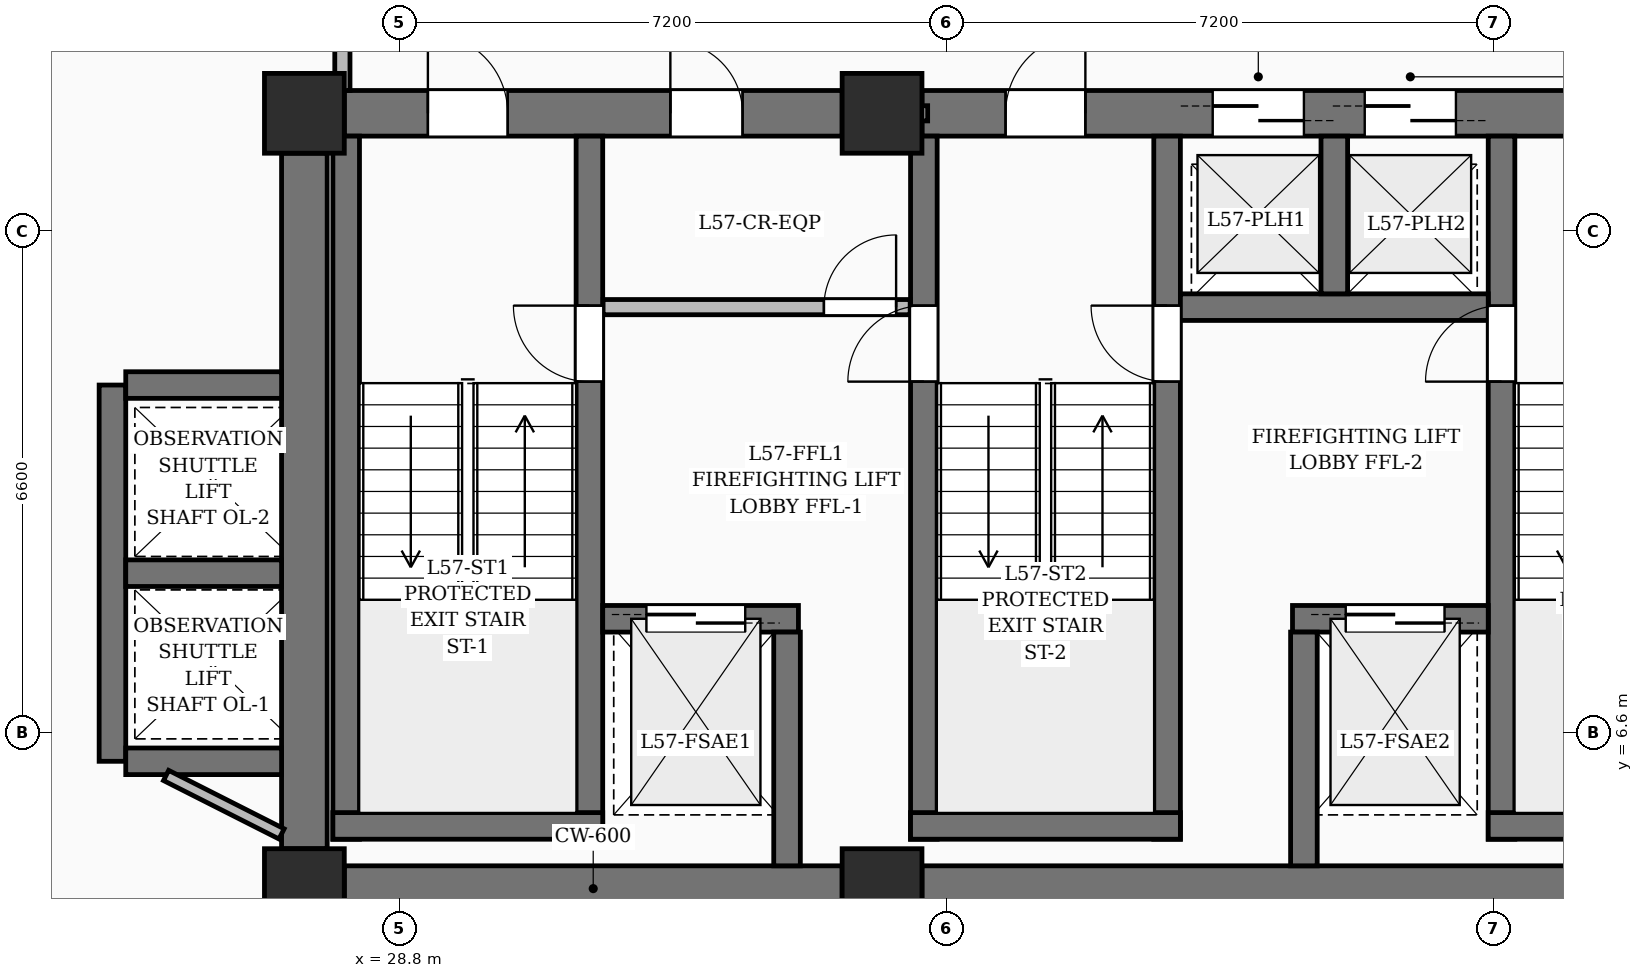
"""IFC4 building model, lengths in metres.
Left out: names, types, materials, properties, quantities, classifications, styles, units other than length and angle.
Written with IfcOpenShell. Run it as: python <this file> out.ifc"""

import sys

from ifc_helpers import new_model, si_unit, direction, frame, frame_2d, origin, origin_2d, place, context, subcontext, project, spatial, rectangle, extrude, element, fill, save


model = new_model("IFC4")
c1 = context("Model", 3, precision=1e-05, world=origin(), true_north=direction((0.0, 1.0)))
c2 = subcontext(c1, "Body", "Model", "MODEL_VIEW")
j1 = project(units=[si_unit("LENGTHUNIT", "METRE"), si_unit("PLANEANGLEUNIT", "RADIAN")], contexts=[c1])
p1 = place(None, origin())
s1 = spatial("IfcSite", under=j1, at=p1, CompositionType="ELEMENT")
p2 = place(p1, origin())
s2 = spatial("IfcBuilding", under=s1, at=p2, CompositionType="ELEMENT")
p3 = place(p2, frame((0.0, 0.0, 222.0)))
s3 = spatial("IfcBuildingStorey", under=s2, at=p3, CompositionType="ELEMENT", Elevation=222.0)
for number, where, z_axis, x_axis in (
    (1, (27.55, 4.55, 0.0), (0.0, 0.0, 1.0), (1.0, 0.0, 0.0)),
    (2, (35.15, 4.55, 0.0), (0.0, 0.0, 1.0), (1.0, 0.0, 0.0)),
    (3, (27.55, 14.75, 0.0), (0.0, 0.0, 1.0), (1.0, 0.0, 0.0)),
    (4, (35.15, 14.75, 0.0), (0.0, 0.0, 1.0), (1.0, 0.0, 0.0)),
):
    element("IfcColumn", number, at=place(p3, frame(where, z_axis=z_axis, x_axis=x_axis)), inside=s3, PredefinedType="COLUMN", context=c2, shape_type="SweptSolid", body=[
        extrude(rectangle(XDim=1.05, YDim=1.05, at=origin_2d()), origin(), (0.0, 0.0, 1.0), 3.75),
    ])
p4 = place(p3, frame((28.075, 4.55, 0.0), z_axis=(0.0, 0.0, 1.0), x_axis=(1.0, 0.0, 0.0)))
e5 = element("IfcWall", 5, at=p4, inside=s3, PredefinedType="SHEAR", context=c2, shape_type="SweptSolid", body=[
    extrude(rectangle(XDim=6.55, YDim=0.6, at=frame_2d((3.275, 0.0))), origin(), (0.0, 0.0, 1.0), 3.75),
])
p5 = place(p3, frame((35.675, 4.55, 0.0), z_axis=(0.0, 0.0, 1.0), x_axis=(1.0, 0.0, 0.0)))
e6 = element("IfcWall", 6, at=p5, inside=s3, PredefinedType="SHEAR", context=c2, shape_type="SweptSolid", body=[
    extrude(rectangle(XDim=10.85, YDim=0.6, at=frame_2d((5.425, 0.0))), origin(), (0.0, 0.0, 1.0), 3.75),
])
p6 = place(p3, frame((28.075, 14.75, 0.0), z_axis=(0.0, 0.0, 1.0), x_axis=(1.0, 0.0, 0.0)))
e7 = element("IfcWall", 7, at=p6, inside=s3, PredefinedType="SHEAR", context=c2, shape_type="SweptSolid", body=[
    extrude(rectangle(XDim=6.55, YDim=0.6, at=frame_2d((3.275, 0.0))), origin(), (0.0, 0.0, 1.0), 3.75),
])
p7 = place(p6, frame((1.1, 0.0, 0.0)))
e8 = element("IfcOpeningElement", 8, at=p7, cuts=e7, PredefinedType="OPENING", context=c2, shape_type="SweptSolid", body=[
    extrude(rectangle(XDim=1.05, YDim=2.15, at=frame_2d((0.525, 1.075))), frame((0.0, 0.31, 0.0), z_axis=(0.0, -1.0, 0.0), x_axis=(1.0, 0.0, 0.0)), (0.0, 0.0, 1.0), 0.62),
])
p8 = place(p6, frame((4.29, 0.0, 0.0)))
e9 = element("IfcOpeningElement", 9, at=p8, cuts=e7, PredefinedType="OPENING", context=c2, shape_type="SweptSolid", body=[
    extrude(rectangle(XDim=0.95, YDim=2.15, at=frame_2d((0.475, 1.075))), frame((0.0, 0.31, 0.0), z_axis=(0.0, -1.0, 0.0), x_axis=(1.0, 0.0, 0.0)), (0.0, 0.0, 1.0), 0.62),
])
p9 = place(p3, frame((35.675, 14.75, 0.0), z_axis=(0.0, 0.0, 1.0), x_axis=(1.0, 0.0, 0.0)))
e10 = element("IfcWall", 10, at=p9, inside=s3, PredefinedType="SHEAR", context=c2, shape_type="SweptSolid", body=[
    extrude(rectangle(XDim=10.85, YDim=0.6, at=frame_2d((5.425, 0.0))), origin(), (0.0, 0.0, 1.0), 3.75),
])
p10 = place(p9, frame((1.1, 0.0, 0.0)))
e11 = element("IfcOpeningElement", 11, at=p10, cuts=e10, PredefinedType="OPENING", context=c2, shape_type="SweptSolid", body=[
    extrude(rectangle(XDim=1.05, YDim=2.15, at=frame_2d((0.525, 1.075))), frame((0.0, 0.31, 0.0), z_axis=(0.0, -1.0, 0.0), x_axis=(1.0, 0.0, 0.0)), (0.0, 0.0, 1.0), 0.62),
])
p11 = place(p9, frame((8.7, 0.0, 0.0)))
e12 = element("IfcOpeningElement", 12, at=p11, cuts=e10, PredefinedType="OPENING", context=c2, shape_type="SweptSolid", body=[
    extrude(rectangle(XDim=1.05, YDim=2.15, at=frame_2d((0.525, 1.075))), frame((0.0, 0.31, 0.0), z_axis=(0.0, -1.0, 0.0), x_axis=(1.0, 0.0, 0.0)), (0.0, 0.0, 1.0), 0.62),
])
p12 = place(p9, frame((3.825, 0.0, 0.0)))
e13 = element("IfcOpeningElement", 13, at=p12, cuts=e10, PredefinedType="OPENING", context=c2, shape_type="SweptSolid", body=[
    extrude(rectangle(XDim=1.2, YDim=2.2, at=frame_2d((0.6, 1.1))), frame((0.0, 0.31, 0.0), z_axis=(0.0, -1.0, 0.0), x_axis=(1.0, 0.0, 0.0)), (0.0, 0.0, 1.0), 0.62),
])
p13 = place(p9, frame((5.825, 0.0, 0.0)))
e14 = element("IfcOpeningElement", 14, at=p13, cuts=e10, PredefinedType="OPENING", context=c2, shape_type="SweptSolid", body=[
    extrude(rectangle(XDim=1.2, YDim=2.2, at=frame_2d((0.6, 1.1))), frame((0.0, 0.31, 0.0), z_axis=(0.0, -1.0, 0.0), x_axis=(1.0, 0.0, 0.0)), (0.0, 0.0, 1.0), 0.62),
])
p14 = place(p3, frame((27.55, 5.075, 0.0), z_axis=(0.0, 0.0, 1.0), x_axis=(0.0, 1.0, 0.0)))
e15 = element("IfcWall", 15, at=p14, inside=s3, PredefinedType="SHEAR", context=c2, shape_type="SweptSolid", body=[
    extrude(rectangle(XDim=9.15, YDim=0.6, at=frame_2d((4.575, 0.0))), origin(), (0.0, 0.0, 1.0), 3.75),
])
p15 = place(p3, frame((28.1, 5.2, 0.0), z_axis=(0.0, 0.0, 1.0), x_axis=(0.0, 1.0, 0.0)))
e16 = element("IfcWall", 16, at=p15, inside=s3, PredefinedType="SOLIDWALL", context=c2, shape_type="SweptSolid", body=[
    extrude(rectangle(XDim=9.25, YDim=0.35, at=frame_2d((4.625, 0.0))), origin(), (0.0, 0.0, 1.0), 3.75),
])
p16 = place(p3, frame((31.3, 5.2, 0.0), z_axis=(0.0, 0.0, 1.0), x_axis=(0.0, 1.0, 0.0)))
e17 = element("IfcWall", 17, at=p16, inside=s3, PredefinedType="SOLIDWALL", context=c2, shape_type="SweptSolid", body=[
    extrude(rectangle(XDim=9.25, YDim=0.35, at=frame_2d((4.625, 0.0))), origin(), (0.0, 0.0, 1.0), 3.75),
])
p17 = place(p16, frame((6.02, 0.0, 0.0)))
e18 = element("IfcOpeningElement", 18, at=p17, cuts=e17, PredefinedType="OPENING", context=c2, shape_type="SweptSolid", body=[
    extrude(rectangle(XDim=1.0, YDim=2.15, at=frame_2d((0.5, 1.075))), frame((0.0, 0.185, 0.0), z_axis=(0.0, -1.0, 0.0), x_axis=(1.0, 0.0, 0.0)), (0.0, 0.0, 1.0), 0.37),
])
p18 = place(p3, frame((27.925, 5.375, 0.0), z_axis=(0.0, 0.0, 1.0), x_axis=(1.0, 0.0, 0.0)))
e19 = element("IfcWall", 19, at=p18, inside=s3, PredefinedType="SOLIDWALL", context=c2, shape_type="SweptSolid", body=[
    extrude(rectangle(XDim=3.55, YDim=0.35, at=frame_2d((1.775, 0.0))), origin(), (0.0, 0.0, 1.0), 3.75),
])
p19 = place(p3, frame((35.7, 5.2, 0.0), z_axis=(0.0, 0.0, 1.0), x_axis=(0.0, 1.0, 0.0)))
e20 = element("IfcWall", 20, at=p19, inside=s3, PredefinedType="SOLIDWALL", context=c2, shape_type="SweptSolid", body=[
    extrude(rectangle(XDim=9.25, YDim=0.35, at=frame_2d((4.625, 0.0))), origin(), (0.0, 0.0, 1.0), 3.75),
])
p20 = place(p19, frame((6.02, 0.0, 0.0)))
e21 = element("IfcOpeningElement", 21, at=p20, cuts=e20, PredefinedType="OPENING", context=c2, shape_type="SweptSolid", body=[
    extrude(rectangle(XDim=1.0, YDim=2.15, at=frame_2d((0.5, 1.075))), frame((0.0, 0.185, 0.0), z_axis=(0.0, -1.0, 0.0), x_axis=(1.0, 0.0, 0.0)), (0.0, 0.0, 1.0), 0.37),
])
p21 = place(p3, frame((38.9, 5.2, 0.0), z_axis=(0.0, 0.0, 1.0), x_axis=(0.0, 1.0, 0.0)))
e22 = element("IfcWall", 22, at=p21, inside=s3, PredefinedType="SOLIDWALL", context=c2, shape_type="SweptSolid", body=[
    extrude(rectangle(XDim=9.25, YDim=0.35, at=frame_2d((4.625, 0.0))), origin(), (0.0, 0.0, 1.0), 3.75),
])
p22 = place(p21, frame((6.02, 0.0, 0.0)))
e23 = element("IfcOpeningElement", 23, at=p22, cuts=e22, PredefinedType="OPENING", context=c2, shape_type="SweptSolid", body=[
    extrude(rectangle(XDim=1.0, YDim=2.15, at=frame_2d((0.5, 1.075))), frame((0.0, 0.185, 0.0), z_axis=(0.0, -1.0, 0.0), x_axis=(1.0, 0.0, 0.0)), (0.0, 0.0, 1.0), 0.37),
])
p23 = place(p3, frame((35.525, 5.375, 0.0), z_axis=(0.0, 0.0, 1.0), x_axis=(1.0, 0.0, 0.0)))
e24 = element("IfcWall", 24, at=p23, inside=s3, PredefinedType="SOLIDWALL", context=c2, shape_type="SweptSolid", body=[
    extrude(rectangle(XDim=3.55, YDim=0.35, at=frame_2d((1.775, 0.0))), origin(), (0.0, 0.0, 1.0), 3.75),
])
p24 = place(p3, frame((43.3, 5.2, 0.0), z_axis=(0.0, 0.0, 1.0), x_axis=(0.0, 1.0, 0.0)))
e25 = element("IfcWall", 25, at=p24, inside=s3, PredefinedType="SOLIDWALL", context=c2, shape_type="SweptSolid", body=[
    extrude(rectangle(XDim=9.25, YDim=0.35, at=frame_2d((4.625, 0.0))), origin(), (0.0, 0.0, 1.0), 3.75),
])
p25 = place(p24, frame((6.02, 0.0, 0.0)))
e26 = element("IfcOpeningElement", 26, at=p25, cuts=e25, PredefinedType="OPENING", context=c2, shape_type="SweptSolid", body=[
    extrude(rectangle(XDim=1.0, YDim=2.15, at=frame_2d((0.5, 1.075))), frame((0.0, 0.185, 0.0), z_axis=(0.0, -1.0, 0.0), x_axis=(1.0, 0.0, 0.0)), (0.0, 0.0, 1.0), 0.37),
])
p26 = place(p3, frame((43.125, 5.375, 0.0), z_axis=(0.0, 0.0, 1.0), x_axis=(1.0, 0.0, 0.0)))
e27 = element("IfcWall", 27, at=p26, inside=s3, PredefinedType="SOLIDWALL", context=c2, shape_type="SweptSolid", body=[
    extrude(rectangle(XDim=3.55, YDim=0.35, at=frame_2d((1.775, 0.0))), origin(), (0.0, 0.0, 1.0), 3.75),
])
p27 = place(p3, frame((31.475, 8.1, 0.0), z_axis=(0.0, 0.0, 1.0), x_axis=(1.0, 0.0, 0.0)))
e28 = element("IfcWall", 28, at=p27, inside=s3, PredefinedType="SOLIDWALL", context=c2, shape_type="SweptSolid", body=[
    extrude(rectangle(XDim=2.575, YDim=0.35, at=frame_2d((1.288, 0.0))), origin(), (0.0, 0.0, 1.0), 3.75),
])
p28 = place(p27, frame((0.575, 0.0, 0.0)))
e29 = element("IfcOpeningElement", 29, at=p28, cuts=e28, PredefinedType="OPENING", context=c2, shape_type="SweptSolid", body=[
    extrude(rectangle(XDim=1.3, YDim=2.25, at=frame_2d((0.65, 1.125))), frame((0.0, 0.185, 0.0), z_axis=(0.0, -1.0, 0.0), x_axis=(1.0, 0.0, 0.0)), (0.0, 0.0, 1.0), 0.37),
])
p29 = place(p3, frame((40.55, 8.1, 0.0), z_axis=(0.0, 0.0, 1.0), x_axis=(1.0, 0.0, 0.0)))
e30 = element("IfcWall", 30, at=p29, inside=s3, PredefinedType="SOLIDWALL", context=c2, shape_type="SweptSolid", body=[
    extrude(rectangle(XDim=2.575, YDim=0.35, at=frame_2d((1.288, 0.0))), origin(), (0.0, 0.0, 1.0), 3.75),
])
p30 = place(p29, frame((0.7, 0.0, 0.0)))
e31 = element("IfcOpeningElement", 31, at=p30, cuts=e30, PredefinedType="OPENING", context=c2, shape_type="SweptSolid", body=[
    extrude(rectangle(XDim=1.3, YDim=2.25, at=frame_2d((0.65, 1.125))), frame((0.0, 0.185, 0.0), z_axis=(0.0, -1.0, 0.0), x_axis=(1.0, 0.0, 0.0)), (0.0, 0.0, 1.0), 0.37),
])
for number, where, z_axis, x_axis in (
    (32, (33.9, 4.85, 0.0), (0.0, 0.0, 1.0), (0.0, 1.0, 0.0)),
    (33, (40.7, 4.85, 0.0), (0.0, 0.0, 1.0), (0.0, 1.0, 0.0)),
):
    element("IfcWall", number, at=place(p3, frame(where, z_axis=z_axis, x_axis=x_axis)), inside=s3, PredefinedType="SOLIDWALL", context=c2, shape_type="SweptSolid", body=[
        extrude(rectangle(XDim=3.075, YDim=0.35, at=frame_2d((1.538, 0.0))), origin(), (0.0, 0.0, 1.0), 3.75),
    ])
p31 = place(p3, frame((39.075, 12.2, 0.0), z_axis=(0.0, 0.0, 1.0), x_axis=(1.0, 0.0, 0.0)))
e34 = element("IfcWall", 34, at=p31, inside=s3, PredefinedType="SOLIDWALL", context=c2, shape_type="SweptSolid", body=[
    extrude(rectangle(XDim=4.05, YDim=0.35, at=frame_2d((2.025, 0.0))), origin(), (0.0, 0.0, 1.0), 3.75),
])
p32 = place(p3, frame((41.1, 12.375, 0.0), z_axis=(0.0, 0.0, 1.0), x_axis=(0.0, 1.0, 0.0)))
e35 = element("IfcWall", 35, at=p32, inside=s3, PredefinedType="SOLIDWALL", context=c2, shape_type="SweptSolid", body=[
    extrude(rectangle(XDim=2.075, YDim=0.35, at=frame_2d((1.038, 0.0))), origin(), (0.0, 0.0, 1.0), 3.75),
])
p33 = place(p3, frame((25.025, 6.225, 0.0), z_axis=(0.0, 0.0, 1.0), x_axis=(0.0, 1.0, 0.0)))
e36 = element("IfcWall", 36, at=p33, inside=s3, PredefinedType="SOLIDWALL", context=c2, shape_type="SweptSolid", body=[
    extrude(rectangle(XDim=4.95, YDim=0.35, at=frame_2d((2.475, 0.0))), origin(), (0.0, 0.0, 1.0), 3.75),
])
for number, where, z_axis, x_axis in (
    (37, (25.2, 6.225, 0.0), (0.0, 0.0, 1.0), (1.0, 0.0, 0.0)),
    (38, (25.2, 8.7, 0.0), (0.0, 0.0, 1.0), (1.0, 0.0, 0.0)),
    (39, (25.2, 11.175, 0.0), (0.0, 0.0, 1.0), (1.0, 0.0, 0.0)),
):
    element("IfcWall", number, at=place(p3, frame(where, z_axis=z_axis, x_axis=x_axis)), inside=s3, PredefinedType="SOLIDWALL", context=c2, shape_type="SweptSolid", body=[
        extrude(rectangle(XDim=2.05, YDim=0.35, at=frame_2d((1.025, 0.0))), origin(), (0.0, 0.0, 1.0), 3.75),
    ])
p34 = place(p3, frame((22.395, 14.695, 0.0), z_axis=(0.0, 0.0, 1.0), x_axis=(0.545593263522, 0.838050112344, 0.0)))
e40 = element("IfcWall", 40, at=p34, inside=s3, PredefinedType="SOLIDWALL", context=c2, shape_type="SweptSolid", body=[
    extrude(rectangle(XDim=5.489, YDim=0.3, at=frame_2d((2.744, 0.0))), origin(), (0.0, 0.0, 1.0), 3.5),
])
p35 = place(p3, frame((34.72, 14.75, 0.0), z_axis=(0.0, 0.0, 1.0), x_axis=(1.0, 0.0, 0.0)))
e41 = element("IfcWall", 41, at=p35, inside=s3, PredefinedType="PARTITIONING", context=c2, shape_type="SweptSolid", body=[
    extrude(rectangle(XDim=1.03, YDim=0.2, at=frame_2d((0.515, 0.0))), origin(), (0.0, 0.0, 1.0), 2.685),
])
p36 = place(p3, frame((31.48, 12.2, 0.0), z_axis=(0.0, 0.0, 1.0), x_axis=(1.0, 0.0, 0.0)))
e42 = element("IfcWall", 42, at=p36, inside=s3, PredefinedType="PARTITIONING", context=c2, shape_type="SweptSolid", body=[
    extrude(rectangle(XDim=4.04, YDim=0.2, at=frame_2d((2.02, 0.0))), origin(), (0.0, 0.0, 1.0), 3.5),
])
p37 = place(p36, frame((2.905, 0.0, 0.0)))
e43 = element("IfcOpeningElement", 43, at=p37, cuts=e42, PredefinedType="OPENING", context=c2, shape_type="SweptSolid", body=[
    extrude(rectangle(XDim=0.95, YDim=2.15, at=frame_2d((0.475, 1.075))), frame((0.0, 0.11, 0.0), z_axis=(0.0, -1.0, 0.0), x_axis=(1.0, 0.0, 0.0)), (0.0, 0.0, 1.0), 0.22),
])
p38 = place(p3, frame((28.05, 16.665, 0.0), z_axis=(0.0, 0.0, 1.0), x_axis=(0.0, -1.0, 0.0)))
e44 = element("IfcWall", 44, at=p38, inside=s3, PredefinedType="PARTITIONING", context=c2, shape_type="SweptSolid", body=[
    extrude(rectangle(XDim=1.615, YDim=0.2, at=frame_2d((0.808, 0.0))), origin(), (0.0, 0.0, 1.0), 3.5),
])
p39 = place(p3, frame((25.73, 6.039, 0.0), z_axis=(0.0, 0.0, 1.0), x_axis=(0.89223758773, -0.451566259857, 0.0)))
e45 = element("IfcWall", 45, at=p39, inside=s3, PredefinedType="PARTITIONING", context=c2, shape_type="SweptSolid", body=[
    extrude(rectangle(XDim=1.703, YDim=0.15, at=frame_2d((0.852, 0.0))), origin(), (0.0, 0.0, 1.0), 3.5),
])
p40 = place(p7, origin())
e46 = element("IfcDoor", 46, at=p40, inside=s3, OperationType="SINGLE_SWING_LEFT", PredefinedType="DOOR", context=c2, shape_type="SweptSolid", body=[
    extrude(rectangle(XDim=1.05, YDim=2.15, at=frame_2d((0.525, 1.075))), frame((0.0, 0.025, 0.0), z_axis=(0.0, -1.0, 0.0), x_axis=(1.0, 0.0, 0.0)), (0.0, 0.0, 1.0), 0.05),
])
fill(e8, e46)
p41 = place(p10, origin())
e47 = element("IfcDoor", 47, at=p41, inside=s3, OperationType="SINGLE_SWING_RIGHT", PredefinedType="DOOR", context=c2, shape_type="SweptSolid", body=[
    extrude(rectangle(XDim=1.05, YDim=2.15, at=frame_2d((0.525, 1.075))), frame((0.0, 0.025, 0.0), z_axis=(0.0, -1.0, 0.0), x_axis=(1.0, 0.0, 0.0)), (0.0, 0.0, 1.0), 0.05),
])
fill(e11, e47)
p42 = place(p17, origin())
e48 = element("IfcDoor", 48, at=p42, inside=s3, OperationType="SINGLE_SWING_RIGHT", PredefinedType="DOOR", context=c2, shape_type="SweptSolid", body=[
    extrude(rectangle(XDim=1.0, YDim=2.15, at=frame_2d((0.5, 1.075))), frame((0.0, 0.025, 0.0), z_axis=(0.0, -1.0, 0.0), x_axis=(1.0, 0.0, 0.0)), (0.0, 0.0, 1.0), 0.05),
])
fill(e18, e48)
p43 = place(p20, origin())
e49 = element("IfcDoor", 49, at=p43, inside=s3, OperationType="SINGLE_SWING_LEFT", PredefinedType="DOOR", context=c2, shape_type="SweptSolid", body=[
    extrude(rectangle(XDim=1.0, YDim=2.15, at=frame_2d((0.5, 1.075))), frame((0.0, 0.025, 0.0), z_axis=(0.0, -1.0, 0.0), x_axis=(1.0, 0.0, 0.0)), (0.0, 0.0, 1.0), 0.05),
])
fill(e21, e49)
p44 = place(p22, origin())
e50 = element("IfcDoor", 50, at=p44, inside=s3, OperationType="SINGLE_SWING_RIGHT", PredefinedType="DOOR", context=c2, shape_type="SweptSolid", body=[
    extrude(rectangle(XDim=1.0, YDim=2.15, at=frame_2d((0.5, 1.075))), frame((0.0, 0.025, 0.0), z_axis=(0.0, -1.0, 0.0), x_axis=(1.0, 0.0, 0.0)), (0.0, 0.0, 1.0), 0.05),
])
fill(e23, e50)
p45 = place(p25, origin())
e51 = element("IfcDoor", 51, at=p45, inside=s3, OperationType="SINGLE_SWING_LEFT", PredefinedType="DOOR", context=c2, shape_type="SweptSolid", body=[
    extrude(rectangle(XDim=1.0, YDim=2.15, at=frame_2d((0.5, 1.075))), frame((0.0, 0.025, 0.0), z_axis=(0.0, -1.0, 0.0), x_axis=(1.0, 0.0, 0.0)), (0.0, 0.0, 1.0), 0.05),
])
fill(e26, e51)
p46 = place(p28, origin())
e52 = element("IfcDoor", 52, at=p46, inside=s3, OperationType="DOUBLE_DOOR_SLIDING", PredefinedType="DOOR", context=c2, shape_type="SweptSolid", body=[
    extrude(rectangle(XDim=1.3, YDim=2.25, at=frame_2d((0.65, 1.125))), frame((0.0, 0.025, 0.0), z_axis=(0.0, -1.0, 0.0), x_axis=(1.0, 0.0, 0.0)), (0.0, 0.0, 1.0), 0.05),
])
fill(e29, e52)
p47 = place(p30, origin())
e53 = element("IfcDoor", 53, at=p47, inside=s3, OperationType="DOUBLE_DOOR_SLIDING", PredefinedType="DOOR", context=c2, shape_type="SweptSolid", body=[
    extrude(rectangle(XDim=1.3, YDim=2.25, at=frame_2d((0.65, 1.125))), frame((0.0, 0.025, 0.0), z_axis=(0.0, -1.0, 0.0), x_axis=(1.0, 0.0, 0.0)), (0.0, 0.0, 1.0), 0.05),
])
fill(e31, e53)
p48 = place(p12, origin())
e54 = element("IfcDoor", 54, at=p48, inside=s3, OperationType="DOUBLE_DOOR_SLIDING", PredefinedType="DOOR", context=c2, shape_type="SweptSolid", body=[
    extrude(rectangle(XDim=1.2, YDim=2.2, at=frame_2d((0.6, 1.1))), frame((0.0, 0.025, 0.0), z_axis=(0.0, -1.0, 0.0), x_axis=(1.0, 0.0, 0.0)), (0.0, 0.0, 1.0), 0.05),
])
fill(e13, e54)
p49 = place(p13, origin())
e55 = element("IfcDoor", 55, at=p49, inside=s3, OperationType="DOUBLE_DOOR_SLIDING", PredefinedType="DOOR", context=c2, shape_type="SweptSolid", body=[
    extrude(rectangle(XDim=1.2, YDim=2.2, at=frame_2d((0.6, 1.1))), frame((0.0, 0.025, 0.0), z_axis=(0.0, -1.0, 0.0), x_axis=(1.0, 0.0, 0.0)), (0.0, 0.0, 1.0), 0.05),
])
fill(e14, e55)
p50 = place(p37, origin())
e56 = element("IfcDoor", 56, at=p50, inside=s3, OperationType="SINGLE_SWING_RIGHT", PredefinedType="DOOR", context=c2, shape_type="SweptSolid", body=[
    extrude(rectangle(XDim=0.95, YDim=2.15, at=frame_2d((0.475, 1.075))), frame((0.0, 0.025, 0.0), z_axis=(0.0, -1.0, 0.0), x_axis=(1.0, 0.0, 0.0)), (0.0, 0.0, 1.0), 0.05),
])
fill(e43, e56)
p51 = place(p8, origin())
e57 = element("IfcDoor", 57, at=p51, inside=s3, OperationType="SINGLE_SWING_LEFT", PredefinedType="DOOR", context=c2, shape_type="SweptSolid", body=[
    extrude(rectangle(XDim=0.95, YDim=2.15, at=frame_2d((0.475, 1.075))), frame((0.0, 0.025, 0.0), z_axis=(0.0, -1.0, 0.0), x_axis=(1.0, 0.0, 0.0)), (0.0, 0.0, 1.0), 0.05),
])
fill(e9, e57)
save(model, sys.argv[1])
